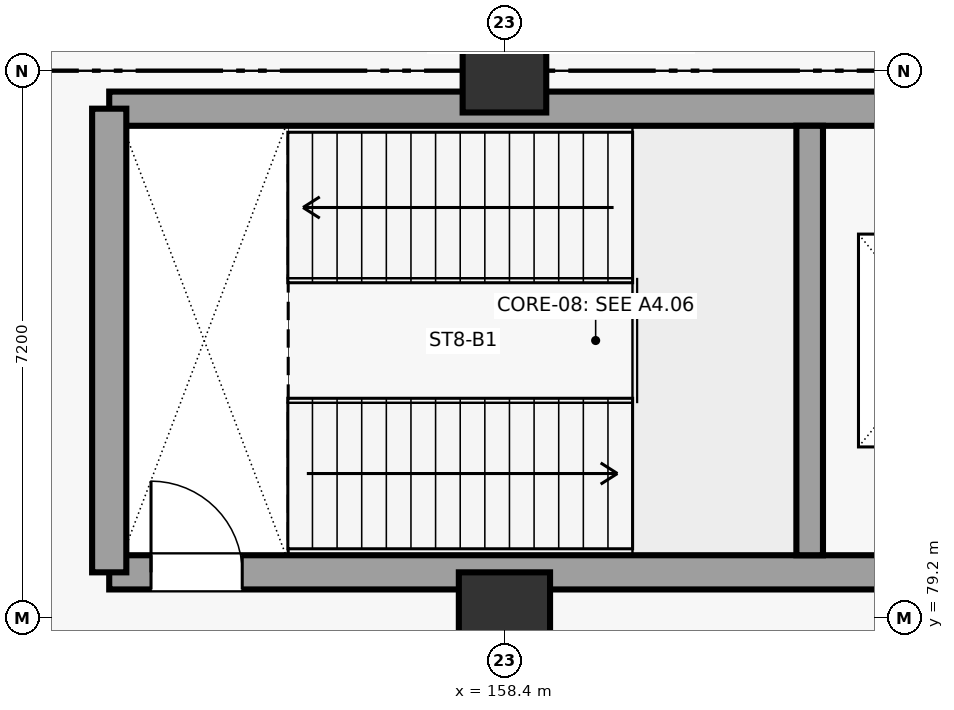
"""IFC4 building model, lengths in metres.
Left out: names, types, materials, properties, quantities, classifications, styles, units other than length and angle.
Written with IfcOpenShell. Run it as: python <this file> out.ifc"""

import sys

from ifc_helpers import new_model, si_unit, direction, frame, frame_2d, origin, origin_2d, place, context, subcontext, project, spatial, rectangle, circle, extrude, element, fill, save


model = new_model("IFC4")
c1 = context("Model", 3, precision=1e-05, world=origin(), true_north=direction((0.0, 1.0)))
c2 = subcontext(c1, "Body", "Model", "MODEL_VIEW")
j1 = project(units=[si_unit("LENGTHUNIT", "METRE"), si_unit("PLANEANGLEUNIT", "RADIAN")], contexts=[c1])
p1 = place(None, origin())
s1 = spatial("IfcSite", under=j1, at=p1, CompositionType="ELEMENT")
p2 = place(p1, origin())
s2 = spatial("IfcBuilding", under=s1, at=p2, CompositionType="ELEMENT")
p3 = place(p2, frame((0.0, 0.0, -5.4)))
s3 = spatial("IfcBuildingStorey", under=s2, at=p3, CompositionType="ELEMENT", Elevation=-5.4)
p4 = place(p3, frame((158.4, 79.2, 0.0), z_axis=(0.0, 0.0, 1.0), x_axis=(1.0, 0.0, 0.0)))
e1 = element("IfcColumn", 1, at=p4, inside=s3, PredefinedType="COLUMN", context=c2, shape_type="SweptSolid", body=[
    extrude(circle(Radius=0.6, at=origin_2d()), origin(), (0.0, 0.0, 1.0), 5.4),
])
p5 = place(p3, frame((158.4, 86.4, 0.0), z_axis=(0.0, 0.0, 1.0), x_axis=(1.0, 0.0, 0.0)))
e2 = element("IfcColumn", 2, at=p5, inside=s3, PredefinedType="COLUMN", context=c2, shape_type="SweptSolid", body=[
    extrude(rectangle(XDim=1.1, YDim=1.1, at=origin_2d()), origin(), (0.0, 0.0, 1.0), 5.4),
])
p6 = place(p3, frame((153.2, 79.8, 0.0), z_axis=(0.0, 0.0, 1.0), x_axis=(1.0, 0.0, 0.0)))
e3 = element("IfcWall", 3, at=p6, inside=s3, PredefinedType="SHEAR", context=c2, shape_type="SweptSolid", body=[
    extrude(rectangle(XDim=12.8, YDim=0.45, at=frame_2d((6.4, 0.0))), origin(), (0.0, 0.0, 1.0), 5.02),
])
p7 = place(p6, frame((0.55, 0.0, 0.0)))
e4 = element("IfcOpeningElement", 4, at=p7, cuts=e3, PredefinedType="OPENING", context=c2, shape_type="SweptSolid", body=[
    extrude(rectangle(XDim=1.2, YDim=2.25, at=frame_2d((0.6, 1.125))), frame((0.0, 0.235, 0.0), z_axis=(0.0, -1.0, 0.0), x_axis=(1.0, 0.0, 0.0)), (0.0, 0.0, 1.0), 0.47),
])
p8 = place(p6, frame((10.108, 0.0, 0.0)))
e5 = element("IfcOpeningElement", 5, at=p8, cuts=e3, PredefinedType="OPENING", context=c2, shape_type="SweptSolid", body=[
    extrude(rectangle(XDim=1.8, YDim=2.4, at=frame_2d((0.9, 1.2))), frame((0.0, 0.235, 0.0), z_axis=(0.0, -1.0, 0.0), x_axis=(1.0, 0.0, 0.0)), (0.0, 0.0, 1.0), 0.47),
])
p9 = place(p3, frame((153.2, 85.9, 0.0), z_axis=(0.0, 0.0, 1.0), x_axis=(1.0, 0.0, 0.0)))
e6 = element("IfcWall", 6, at=p9, inside=s3, PredefinedType="SHEAR", context=c2, shape_type="SweptSolid", body=[
    extrude(rectangle(XDim=12.8, YDim=0.45, at=frame_2d((6.4, 0.0))), origin(), (0.0, 0.0, 1.0), 5.02),
])
p10 = place(p3, frame((153.2, 79.8, 0.0), z_axis=(0.0, 0.0, 1.0), x_axis=(0.0, 1.0, 0.0)))
e7 = element("IfcWall", 7, at=p10, inside=s3, PredefinedType="SHEAR", context=c2, shape_type="SweptSolid", body=[
    extrude(rectangle(XDim=6.1, YDim=0.45, at=frame_2d((3.05, 0.0))), origin(), (0.0, 0.0, 1.0), 5.02),
])
p11 = place(p3, frame((162.416, 80.025, 0.0), z_axis=(0.0, 0.0, 1.0), x_axis=(0.0, 1.0, 0.0)))
e8 = element("IfcWall", 8, at=p11, inside=s3, PredefinedType="SHEAR", context=c2, shape_type="SweptSolid", body=[
    extrude(rectangle(XDim=5.65, YDim=0.35, at=frame_2d((2.825, 0.0))), origin(), (0.0, 0.0, 1.0), 5.02),
])
p12 = place(p7, origin())
e9 = element("IfcDoor", 9, at=p12, inside=s3, OperationType="SINGLE_SWING_LEFT", PredefinedType="DOOR", context=c2, shape_type="SweptSolid", body=[
    extrude(rectangle(XDim=1.2, YDim=2.25, at=frame_2d((0.6, 1.125))), frame((0.0, 0.025, 0.0), z_axis=(0.0, -1.0, 0.0), x_axis=(1.0, 0.0, 0.0)), (0.0, 0.0, 1.0), 0.05),
])
fill(e4, e9)
save(model, sys.argv[1])
